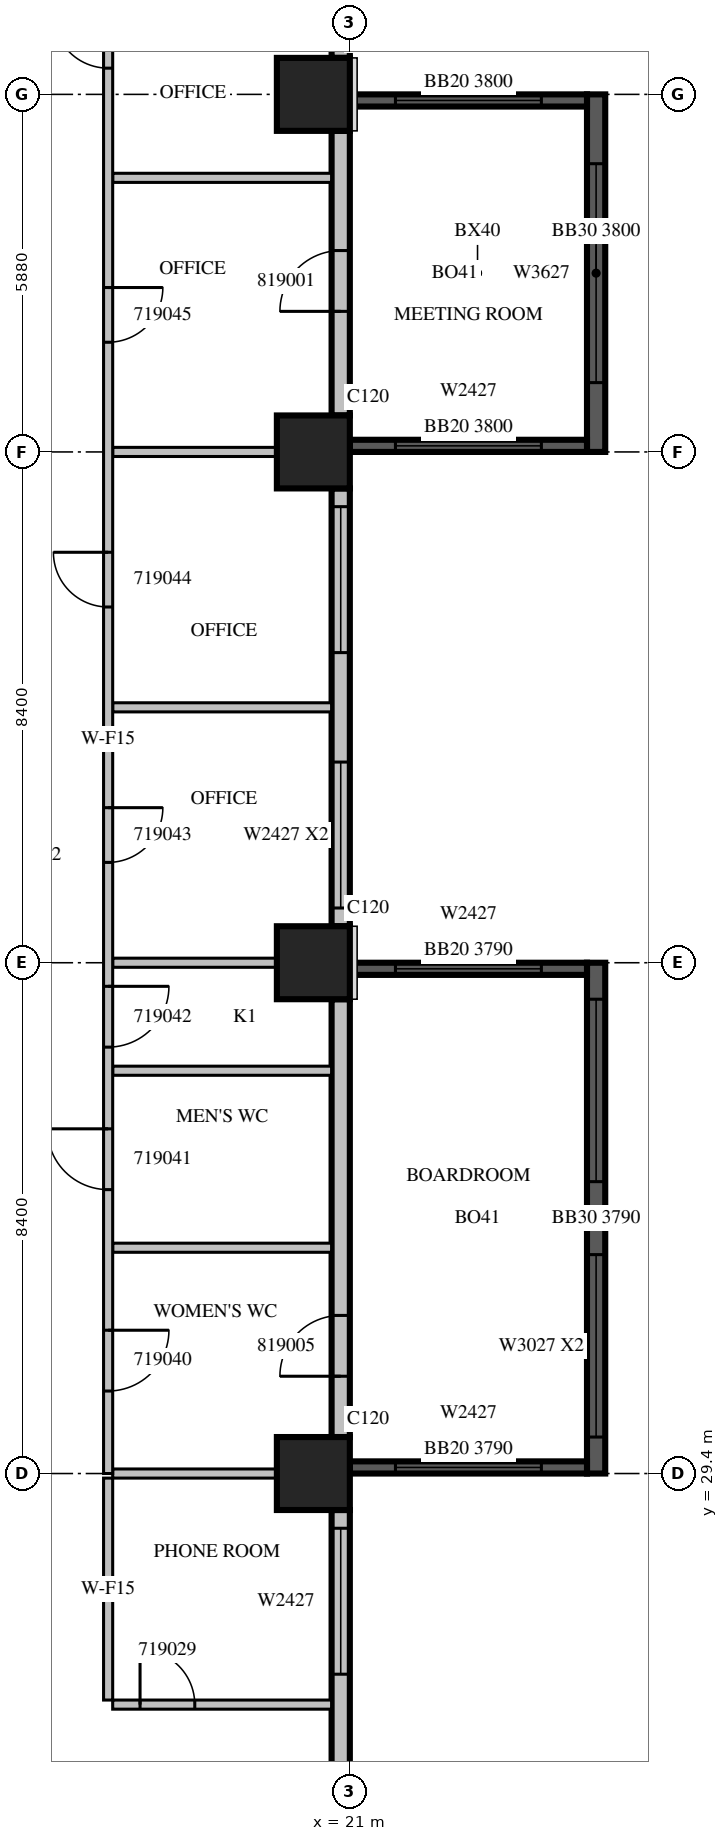
"""IFC4 building model, lengths in metres.
Left out: names, types, materials, properties, quantities, classifications, styles, units other than length and angle.
Written with IfcOpenShell. Run it as: python <this file> out.ifc"""

import sys

from ifc_helpers import new_model, si_unit, direction, frame, frame_2d, origin, origin_2d, place, context, subcontext, project, spatial, rectangle, extrude, source, transform, mapped, element, fill, save


model = new_model("IFC4")
c1 = context("Model", 3, precision=1e-05, world=origin(), true_north=direction((0.0, 1.0)))
c2 = subcontext(c1, "Body", "Model", "MODEL_VIEW")
j1 = project(units=[si_unit("LENGTHUNIT", "METRE"), si_unit("PLANEANGLEUNIT", "RADIAN")], contexts=[c1])
p1 = place(None, origin())
s1 = spatial("IfcSite", under=j1, at=p1, CompositionType="ELEMENT")
p2 = place(p1, origin())
s2 = spatial("IfcBuilding", under=s1, at=p2, CompositionType="ELEMENT")
p3 = place(p2, frame((0.0, 0.0, 90.9)))
s3 = spatial("IfcBuildingStorey", under=s2, at=p3, CompositionType="ELEMENT", Elevation=90.9)
m1 = source(origin(), c2, "Body", "SweptSolid", [
    extrude(rectangle(XDim=1.2, YDim=1.2, at=origin_2d()), origin(), (0.0, 0.0, 1.0), 4.2),
])
for number, where, z_axis, x_axis in (
    (1, (20.4, 29.4, 0.0), (0.0, 0.0, 1.0), (1.0, 0.0, 0.0)),
    (2, (20.4, 37.8, 0.0), (0.0, 0.0, 1.0), (1.0, 0.0, 0.0)),
    (3, (20.4, 46.2, 0.0), (0.0, 0.0, 1.0), (1.0, 0.0, 0.0)),
    (4, (20.4, 52.08, 0.0), (0.0, 0.0, 1.0), (1.0, 0.0, 0.0)),
):
    element("IfcColumn", number, at=place(p3, frame(where, z_axis=z_axis, x_axis=x_axis)), inside=s3, PredefinedType="COLUMN", context=c2, shape_type="MappedRepresentation", body=[
        mapped(m1, transform((0.0, 0.0, 0.0), scale=1.0)),
    ])
m2 = source(origin(), c2, "Body", "SweptSolid", [
    extrude(rectangle(XDim=5.88, YDim=0.3, at=frame_2d((2.94, 0.0))), origin(), (0.0, 0.0, 1.0), 3.8),
])
p4 = place(p3, frame((25.05, 46.2, 0.0), z_axis=(0.0, 0.0, 1.0), x_axis=(0.0, 1.0, 0.0)))
e5 = element("IfcWall", 5, at=p4, inside=s3, PredefinedType="SOLIDWALL", context=c2, shape_type="MappedRepresentation", body=[
    mapped(m2, transform((0.0, 0.0, 0.0), scale=1.0)),
])
m3 = source(origin(), c2, "Body", "SweptSolid", [
    extrude(rectangle(XDim=3.6, YDim=2.7, at=frame_2d((1.8, 1.35))), frame((0.0, 0.16, 0.0), z_axis=(0.0, -1.0, 0.0), x_axis=(1.0, 0.0, 0.0)), (0.0, 0.0, 1.0), 0.32),
])
p5 = place(p4, frame((1.14, 0.0, 0.6)))
e6 = element("IfcOpeningElement", 6, at=p5, cuts=e5, PredefinedType="OPENING", context=c2, shape_type="MappedRepresentation", body=[
    mapped(m3, transform((0.0, 0.0, 0.0), scale=1.0)),
])
m4 = source(origin(), c2, "Body", "SweptSolid", [
    extrude(rectangle(XDim=3.9, YDim=0.2, at=frame_2d((1.95, 0.0))), origin(), (0.0, 0.0, 1.0), 3.8),
])
p6 = place(p3, frame((21.0, 46.3, 0.0), z_axis=(0.0, 0.0, 1.0), x_axis=(1.0, 0.0, 0.0)))
e7 = element("IfcWall", 7, at=p6, inside=s3, PredefinedType="SOLIDWALL", context=c2, shape_type="MappedRepresentation", body=[
    mapped(m4, transform((0.0, 0.0, 0.0), scale=1.0)),
])
m5 = source(origin(), c2, "Body", "SweptSolid", [
    extrude(rectangle(XDim=2.4, YDim=2.7, at=frame_2d((1.2, 1.35))), frame((0.0, 0.11, 0.0), z_axis=(0.0, -1.0, 0.0), x_axis=(1.0, 0.0, 0.0)), (0.0, 0.0, 1.0), 0.22),
])
p7 = place(p6, frame((0.75, 0.0, 0.6)))
e8 = element("IfcOpeningElement", 8, at=p7, cuts=e7, PredefinedType="OPENING", context=c2, shape_type="MappedRepresentation", body=[
    mapped(m5, transform((0.0, 0.0, 0.0), scale=1.0)),
])
p8 = place(p3, frame((21.0, 51.98, 0.0), z_axis=(0.0, 0.0, 1.0), x_axis=(1.0, 0.0, 0.0)))
e9 = element("IfcWall", 9, at=p8, inside=s3, PredefinedType="SOLIDWALL", context=c2, shape_type="MappedRepresentation", body=[
    mapped(m4, transform((0.0, 0.0, 0.0), scale=1.0)),
])
p9 = place(p8, frame((0.75, 0.0, 0.6)))
e10 = element("IfcOpeningElement", 10, at=p9, cuts=e9, PredefinedType="OPENING", context=c2, shape_type="MappedRepresentation", body=[
    mapped(m5, transform((0.0, 0.0, 0.0), scale=1.0)),
])
m6 = source(origin(), c2, "Body", "SweptSolid", [
    extrude(rectangle(XDim=6.6, YDim=0.3, at=frame_2d((3.3, 0.0))), origin(), (0.0, 0.0, 1.0), 3.8),
])
p10 = place(p3, frame((20.85, 22.2, 0.0), z_axis=(0.0, 0.0, 1.0), x_axis=(0.0, 1.0, 0.0)))
e11 = element("IfcWall", 11, at=p10, inside=s3, PredefinedType="STANDARD", context=c2, shape_type="MappedRepresentation", body=[
    mapped(m6, transform((0.0, 0.0, 0.0), scale=1.0)),
])
m7 = source(origin(), c2, "Body", "SweptSolid", [
    extrude(rectangle(XDim=1.2, YDim=2.7, at=frame_2d((0.6, 1.35))), frame((0.0, 0.16, 0.0), z_axis=(0.0, -1.0, 0.0), x_axis=(1.0, 0.0, 0.0)), (0.0, 0.0, 1.0), 0.32),
])
p11 = place(p10, frame((0.3, 0.0, 0.6)))
e12 = element("IfcOpeningElement", 12, at=p11, cuts=e11, PredefinedType="OPENING", context=c2, shape_type="MappedRepresentation", body=[
    mapped(m7, transform((0.0, 0.0, 0.0), scale=1.0)),
])
m8 = source(origin(), c2, "Body", "SweptSolid", [
    extrude(rectangle(XDim=2.4, YDim=2.7, at=frame_2d((1.2, 1.35))), frame((0.0, 0.16, 0.0), z_axis=(0.0, -1.0, 0.0), x_axis=(1.0, 0.0, 0.0)), (0.0, 0.0, 1.0), 0.32),
])
p12 = place(p10, frame((3.9, 0.0, 0.6)))
e13 = element("IfcOpeningElement", 13, at=p12, cuts=e11, PredefinedType="OPENING", context=c2, shape_type="MappedRepresentation", body=[
    mapped(m8, transform((0.0, 0.0, 0.0), scale=1.0)),
])
m9 = source(origin(), c2, "Body", "SweptSolid", [
    extrude(rectangle(XDim=7.2, YDim=0.3, at=frame_2d((3.6, 0.0))), origin(), (0.0, 0.0, 1.0), 3.8),
])
p13 = place(p3, frame((20.85, 30.0, 0.0), z_axis=(0.0, 0.0, 1.0), x_axis=(0.0, 1.0, 0.0)))
e14 = element("IfcWall", 14, at=p13, inside=s3, PredefinedType="STANDARD", context=c2, shape_type="MappedRepresentation", body=[
    mapped(m9, transform((0.0, 0.0, 0.0), scale=1.0)),
])
m10 = source(origin(), c2, "Body", "SweptSolid", [
    extrude(rectangle(XDim=1.0, YDim=2.1, at=frame_2d((0.5, 1.05))), frame((0.0, 0.16, 0.0), z_axis=(0.0, -1.0, 0.0), x_axis=(1.0, 0.0, 0.0)), (0.0, 0.0, 1.0), 0.32),
])
p14 = place(p13, frame((1.0, 0.0, 0.0)))
e15 = element("IfcOpeningElement", 15, at=p14, cuts=e14, PredefinedType="OPENING", context=c2, shape_type="MappedRepresentation", body=[
    mapped(m10, transform((0.0, 0.0, 0.0), scale=1.0)),
])
p15 = place(p3, frame((20.85, 38.4, 0.0), z_axis=(0.0, 0.0, 1.0), x_axis=(0.0, 1.0, 0.0)))
e16 = element("IfcWall", 16, at=p15, inside=s3, PredefinedType="STANDARD", context=c2, shape_type="MappedRepresentation", body=[
    mapped(m9, transform((0.0, 0.0, 0.0), scale=1.0)),
])
p16 = place(p15, frame((0.3, 0.0, 0.6)))
e17 = element("IfcOpeningElement", 17, at=p16, cuts=e16, PredefinedType="OPENING", context=c2, shape_type="MappedRepresentation", body=[
    mapped(m8, transform((0.0, 0.0, 0.0), scale=1.0)),
])
p17 = place(p15, frame((4.5, 0.0, 0.6)))
e18 = element("IfcOpeningElement", 18, at=p17, cuts=e16, PredefinedType="OPENING", context=c2, shape_type="MappedRepresentation", body=[
    mapped(m8, transform((0.0, 0.0, 0.0), scale=1.0)),
])
m11 = source(origin(), c2, "Body", "SweptSolid", [
    extrude(rectangle(XDim=4.68, YDim=0.3, at=frame_2d((2.34, 0.0))), origin(), (0.0, 0.0, 1.0), 3.8),
])
p18 = place(p3, frame((20.85, 46.8, 0.0), z_axis=(0.0, 0.0, 1.0), x_axis=(0.0, 1.0, 0.0)))
e19 = element("IfcWall", 19, at=p18, inside=s3, PredefinedType="STANDARD", context=c2, shape_type="MappedRepresentation", body=[
    mapped(m11, transform((0.0, 0.0, 0.0), scale=1.0)),
])
p19 = place(p18, frame((1.712, 0.0, 0.0)))
e20 = element("IfcOpeningElement", 20, at=p19, cuts=e19, PredefinedType="OPENING", context=c2, shape_type="MappedRepresentation", body=[
    mapped(m10, transform((0.0, 0.0, 0.0), scale=1.0)),
])
m12 = source(origin(), c2, "Body", "SweptSolid", [
    extrude(rectangle(XDim=1.08, YDim=0.3, at=frame_2d((0.54, 0.0))), origin(), (0.0, 0.0, 1.0), 3.8),
])
p20 = place(p3, frame((20.85, 52.68, 0.0), z_axis=(0.0, 0.0, 1.0), x_axis=(0.0, 1.0, 0.0)))
e21 = element("IfcWall", 21, at=p20, inside=s3, PredefinedType="STANDARD", context=c2, shape_type="MappedRepresentation", body=[
    mapped(m12, transform((0.0, 0.0, 0.0), scale=1.0)),
])
m13 = source(origin(), c2, "Body", "SweptSolid", [
    extrude(rectangle(XDim=8.4, YDim=0.3, at=frame_2d((4.2, 0.0))), origin(), (0.0, 0.0, 1.0), 3.79),
])
p21 = place(p3, frame((25.05, 29.4, 0.0), z_axis=(0.0, 0.0, 1.0), x_axis=(0.0, 1.0, 0.0)))
e22 = element("IfcWall", 22, at=p21, inside=s3, PredefinedType="SOLIDWALL", context=c2, shape_type="MappedRepresentation", body=[
    mapped(m13, transform((0.0, 0.0, 0.0), scale=1.0)),
])
m14 = source(origin(), c2, "Body", "SweptSolid", [
    extrude(rectangle(XDim=3.0, YDim=2.7, at=frame_2d((1.5, 1.35))), frame((0.0, 0.16, 0.0), z_axis=(0.0, -1.0, 0.0), x_axis=(1.0, 0.0, 0.0)), (0.0, 0.0, 1.0), 0.32),
])
p22 = place(p21, frame((0.6, 0.0, 0.6)))
e23 = element("IfcOpeningElement", 23, at=p22, cuts=e22, PredefinedType="OPENING", context=c2, shape_type="MappedRepresentation", body=[
    mapped(m14, transform((0.0, 0.0, 0.0), scale=1.0)),
])
p23 = place(p21, frame((4.8, 0.0, 0.6)))
e24 = element("IfcOpeningElement", 24, at=p23, cuts=e22, PredefinedType="OPENING", context=c2, shape_type="MappedRepresentation", body=[
    mapped(m14, transform((0.0, 0.0, 0.0), scale=1.0)),
])
m15 = source(origin(), c2, "Body", "SweptSolid", [
    extrude(rectangle(XDim=3.9, YDim=0.2, at=frame_2d((1.95, 0.0))), origin(), (0.0, 0.0, 1.0), 3.79),
])
p24 = place(p3, frame((21.0, 29.5, 0.0), z_axis=(0.0, 0.0, 1.0), x_axis=(1.0, 0.0, 0.0)))
e25 = element("IfcWall", 25, at=p24, inside=s3, PredefinedType="SOLIDWALL", context=c2, shape_type="MappedRepresentation", body=[
    mapped(m15, transform((0.0, 0.0, 0.0), scale=1.0)),
])
p25 = place(p24, frame((0.75, 0.0, 0.6)))
e26 = element("IfcOpeningElement", 26, at=p25, cuts=e25, PredefinedType="OPENING", context=c2, shape_type="MappedRepresentation", body=[
    mapped(m5, transform((0.0, 0.0, 0.0), scale=1.0)),
])
p26 = place(p3, frame((21.0, 37.7, 0.0), z_axis=(0.0, 0.0, 1.0), x_axis=(1.0, 0.0, 0.0)))
e27 = element("IfcWall", 27, at=p26, inside=s3, PredefinedType="SOLIDWALL", context=c2, shape_type="MappedRepresentation", body=[
    mapped(m15, transform((0.0, 0.0, 0.0), scale=1.0)),
])
p27 = place(p26, frame((0.75, 0.0, 0.6)))
e28 = element("IfcOpeningElement", 28, at=p27, cuts=e27, PredefinedType="OPENING", context=c2, shape_type="MappedRepresentation", body=[
    mapped(m5, transform((0.0, 0.0, 0.0), scale=1.0)),
])
m16 = source(origin(), c2, "Body", "SweptSolid", [
    extrude(rectangle(XDim=3.6, YDim=0.15, at=frame_2d((1.8, 0.0))), origin(), (0.0, 0.0, 1.0), 3.8),
])
p28 = place(p3, frame((17.1, 25.6, 0.0), z_axis=(0.0, 0.0, 1.0), x_axis=(1.0, 0.0, 0.0)))
e29 = element("IfcWall", 29, at=p28, inside=s3, PredefinedType="PARTITIONING", context=c2, shape_type="MappedRepresentation", body=[
    mapped(m16, transform((0.0, 0.0, 0.0), scale=1.0)),
])
m17 = source(origin(), c2, "Body", "SweptSolid", [
    extrude(rectangle(XDim=0.9, YDim=2.1, at=frame_2d((0.45, 1.05))), frame((0.0, 0.085, 0.0), z_axis=(0.0, -1.0, 0.0), x_axis=(1.0, 0.0, 0.0)), (0.0, 0.0, 1.0), 0.17),
])
p29 = place(p28, frame((0.45, 0.0, 0.0)))
e30 = element("IfcOpeningElement", 30, at=p29, cuts=e29, PredefinedType="OPENING", context=c2, shape_type="MappedRepresentation", body=[
    mapped(m17, transform((0.0, 0.0, 0.0), scale=1.0)),
])
m18 = source(origin(), c2, "Body", "SweptSolid", [
    extrude(rectangle(XDim=3.65, YDim=0.15, at=frame_2d((1.825, 0.0))), origin(), (0.0, 0.0, 1.0), 3.8),
])
p30 = place(p3, frame((17.025, 29.325, 0.0), z_axis=(0.0, 0.0, 1.0), x_axis=(0.0, -1.0, 0.0)))
e31 = element("IfcWall", 31, at=p30, inside=s3, PredefinedType="PARTITIONING", context=c2, shape_type="MappedRepresentation", body=[
    mapped(m18, transform((0.0, 0.0, 0.0), scale=1.0)),
])
m19 = source(origin(), c2, "Body", "SweptSolid", [
    extrude(rectangle(XDim=2.701, YDim=0.15, at=frame_2d((1.351, 0.0))), origin(), (0.0, 0.0, 1.0), 3.8),
])
p31 = place(p3, frame((19.801, 29.4, 0.0), z_axis=(0.0, 0.0, 1.0), x_axis=(-1.0, 0.0, 0.0)))
e32 = element("IfcWall", 32, at=p31, inside=s3, PredefinedType="PARTITIONING", context=c2, shape_type="MappedRepresentation", body=[
    mapped(m19, transform((0.0, 0.0, 0.0), scale=1.0)),
])
for number, where, z_axis, x_axis in (
    (33, (17.1, 33.113, 0.0), (0.0, 0.0, 1.0), (1.0, 0.0, 0.0)),
    (34, (17.1, 36.024, 0.0), (0.0, 0.0, 1.0), (1.0, 0.0, 0.0)),
    (35, (17.1, 42.0, 0.0), (0.0, 0.0, 1.0), (1.0, 0.0, 0.0)),
    (36, (17.1, 50.708, 0.0), (0.0, 0.0, 1.0), (1.0, 0.0, 0.0)),
):
    element("IfcWall", number, at=place(p3, frame(where, z_axis=z_axis, x_axis=x_axis)), inside=s3, PredefinedType="PARTITIONING", context=c2, shape_type="MappedRepresentation", body=[
        mapped(m16, transform((0.0, 0.0, 0.0), scale=1.0)),
    ])
for number, where, z_axis, x_axis in (
    (37, (19.801, 37.8, 0.0), (0.0, 0.0, 1.0), (-1.0, 0.0, 0.0)),
    (38, (19.801, 46.2, 0.0), (0.0, 0.0, 1.0), (-1.0, 0.0, 0.0)),
):
    element("IfcWall", number, at=place(p3, frame(where, z_axis=z_axis, x_axis=x_axis)), inside=s3, PredefinedType="PARTITIONING", context=c2, shape_type="MappedRepresentation", body=[
        mapped(m19, transform((0.0, 0.0, 0.0), scale=1.0)),
    ])
p32 = place(p3, frame((17.025, 53.555, 0.0), z_axis=(0.0, 0.0, 1.0), x_axis=(0.0, -1.0, 0.0)))
e39 = element("IfcWall", 39, at=p32, inside=s3, PredefinedType="PARTITIONING", context=c2, shape_type="SweptSolid", body=[
    extrude(rectangle(XDim=24.155, YDim=0.15, at=frame_2d((12.078, 0.0))), origin(), (0.0, 0.0, 1.0), 3.8),
])
m20 = source(origin(), c2, "Body", "SweptSolid", [
    extrude(rectangle(XDim=1.0, YDim=2.1, at=frame_2d((0.5, 1.05))), frame((0.0, 0.085, 0.0), z_axis=(0.0, -1.0, 0.0), x_axis=(1.0, 0.0, 0.0)), (0.0, 0.0, 1.0), 0.17),
])
p33 = place(p32, frame((21.798, 0.0, 0.0)))
e40 = element("IfcOpeningElement", 40, at=p33, cuts=e39, PredefinedType="OPENING", context=c2, shape_type="MappedRepresentation", body=[
    mapped(m20, transform((0.0, 0.0, 0.0), scale=1.0)),
])
p34 = place(p32, frame((18.486, 0.0, 0.0)))
e41 = element("IfcOpeningElement", 41, at=p34, cuts=e39, PredefinedType="OPENING", context=c2, shape_type="MappedRepresentation", body=[
    mapped(m20, transform((0.0, 0.0, 0.0), scale=1.0)),
])
p35 = place(p32, frame((16.143, 0.0, 0.0)))
e42 = element("IfcOpeningElement", 42, at=p35, cuts=e39, PredefinedType="OPENING", context=c2, shape_type="MappedRepresentation", body=[
    mapped(m20, transform((0.0, 0.0, 0.0), scale=1.0)),
])
p36 = place(p32, frame((13.205, 0.0, 0.0)))
e43 = element("IfcOpeningElement", 43, at=p36, cuts=e39, PredefinedType="OPENING", context=c2, shape_type="MappedRepresentation", body=[
    mapped(m17, transform((0.0, 0.0, 0.0), scale=1.0)),
])
p37 = place(p32, frame((9.005, 0.0, 0.0)))
e44 = element("IfcOpeningElement", 44, at=p37, cuts=e39, PredefinedType="OPENING", context=c2, shape_type="MappedRepresentation", body=[
    mapped(m17, transform((0.0, 0.0, 0.0), scale=1.0)),
])
p38 = place(p32, frame((4.651, 0.0, 0.0)))
e45 = element("IfcOpeningElement", 45, at=p38, cuts=e39, PredefinedType="OPENING", context=c2, shape_type="MappedRepresentation", body=[
    mapped(m17, transform((0.0, 0.0, 0.0), scale=1.0)),
])
p39 = place(p32, frame((0.144, 0.0, 0.0)))
e46 = element("IfcOpeningElement", 46, at=p39, cuts=e39, PredefinedType="OPENING", context=c2, shape_type="MappedRepresentation", body=[
    mapped(m17, transform((0.0, 0.0, 0.0), scale=1.0)),
])
m21 = source(origin(), c2, "Body", "SweptSolid", [
    extrude(rectangle(XDim=3.6, YDim=2.7, at=frame_2d((1.8, 1.35))), frame((0.0, 0.03, 0.0), z_axis=(0.0, -1.0, 0.0), x_axis=(1.0, 0.0, 0.0)), (0.0, 0.0, 1.0), 0.06),
])
p40 = place(p5, origin())
e47 = element("IfcWindow", 47, at=p40, inside=s3, PartitioningType="SINGLE_PANEL", PredefinedType="WINDOW", context=c2, shape_type="MappedRepresentation", body=[
    mapped(m21, transform((0.0, 0.0, 0.0), scale=1.0)),
])
fill(e6, e47)
m22 = source(origin(), c2, "Body", "SweptSolid", [
    extrude(rectangle(XDim=2.4, YDim=2.7, at=frame_2d((1.2, 1.35))), frame((0.0, 0.03, 0.0), z_axis=(0.0, -1.0, 0.0), x_axis=(1.0, 0.0, 0.0)), (0.0, 0.0, 1.0), 0.06),
])
p41 = place(p7, origin())
e48 = element("IfcWindow", 48, at=p41, inside=s3, PartitioningType="SINGLE_PANEL", PredefinedType="WINDOW", context=c2, shape_type="MappedRepresentation", body=[
    mapped(m22, transform((0.0, 0.0, 0.0), scale=1.0)),
])
fill(e8, e48)
p42 = place(p9, origin())
e49 = element("IfcWindow", 49, at=p42, inside=s3, PartitioningType="SINGLE_PANEL", PredefinedType="WINDOW", context=c2, shape_type="MappedRepresentation", body=[
    mapped(m22, transform((0.0, 0.0, 0.0), scale=1.0)),
])
fill(e10, e49)
p43 = place(p12, origin())
e50 = element("IfcWindow", 50, at=p43, inside=s3, PartitioningType="SINGLE_PANEL", PredefinedType="WINDOW", context=c2, shape_type="MappedRepresentation", body=[
    mapped(m22, transform((0.0, 0.0, 0.0), scale=1.0)),
])
fill(e13, e50)
p44 = place(p16, origin())
e51 = element("IfcWindow", 51, at=p44, inside=s3, PartitioningType="SINGLE_PANEL", PredefinedType="WINDOW", context=c2, shape_type="MappedRepresentation", body=[
    mapped(m22, transform((0.0, 0.0, 0.0), scale=1.0)),
])
fill(e17, e51)
p45 = place(p17, origin())
e52 = element("IfcWindow", 52, at=p45, inside=s3, PartitioningType="SINGLE_PANEL", PredefinedType="WINDOW", context=c2, shape_type="MappedRepresentation", body=[
    mapped(m22, transform((0.0, 0.0, 0.0), scale=1.0)),
])
fill(e18, e52)
m23 = source(origin(), c2, "Body", "SweptSolid", [
    extrude(rectangle(XDim=3.0, YDim=2.7, at=frame_2d((1.5, 1.35))), frame((0.0, 0.03, 0.0), z_axis=(0.0, -1.0, 0.0), x_axis=(1.0, 0.0, 0.0)), (0.0, 0.0, 1.0), 0.06),
])
p46 = place(p22, origin())
e53 = element("IfcWindow", 53, at=p46, inside=s3, PartitioningType="SINGLE_PANEL", PredefinedType="WINDOW", context=c2, shape_type="MappedRepresentation", body=[
    mapped(m23, transform((0.0, 0.0, 0.0), scale=1.0)),
])
fill(e23, e53)
p47 = place(p23, origin())
e54 = element("IfcWindow", 54, at=p47, inside=s3, PartitioningType="SINGLE_PANEL", PredefinedType="WINDOW", context=c2, shape_type="MappedRepresentation", body=[
    mapped(m23, transform((0.0, 0.0, 0.0), scale=1.0)),
])
fill(e24, e54)
p48 = place(p25, origin())
e55 = element("IfcWindow", 55, at=p48, inside=s3, PartitioningType="SINGLE_PANEL", PredefinedType="WINDOW", context=c2, shape_type="MappedRepresentation", body=[
    mapped(m22, transform((0.0, 0.0, 0.0), scale=1.0)),
])
fill(e26, e55)
p49 = place(p27, origin())
e56 = element("IfcWindow", 56, at=p49, inside=s3, PartitioningType="SINGLE_PANEL", PredefinedType="WINDOW", context=c2, shape_type="MappedRepresentation", body=[
    mapped(m22, transform((0.0, 0.0, 0.0), scale=1.0)),
])
fill(e28, e56)
m24 = source(origin(), c2, "Body", "SweptSolid", [
    extrude(rectangle(XDim=0.9, YDim=2.1, at=frame_2d((0.45, 1.05))), frame((0.0, 0.025, 0.0), z_axis=(0.0, -1.0, 0.0), x_axis=(1.0, 0.0, 0.0)), (0.0, 0.0, 1.0), 0.05),
])
p50 = place(p29, origin())
e57 = element("IfcDoor", 57, at=p50, inside=s3, OperationType="SINGLE_SWING_LEFT", PredefinedType="DOOR", context=c2, shape_type="MappedRepresentation", body=[
    mapped(m24, transform((0.0, 0.0, 0.0), scale=1.0)),
])
fill(e30, e57)
m25 = source(origin(), c2, "Body", "SweptSolid", [
    extrude(rectangle(XDim=1.0, YDim=2.1, at=frame_2d((0.5, 1.05))), frame((0.0, 0.025, 0.0), z_axis=(0.0, -1.0, 0.0), x_axis=(1.0, 0.0, 0.0)), (0.0, 0.0, 1.0), 0.05),
])
p51 = place(p33, origin())
e58 = element("IfcDoor", 58, at=p51, inside=s3, OperationType="SINGLE_SWING_LEFT", PredefinedType="DOOR", context=c2, shape_type="MappedRepresentation", body=[
    mapped(m25, transform((0.0, 0.0, 0.0), scale=1.0)),
])
fill(e40, e58)
p52 = place(p34, origin())
e59 = element("IfcDoor", 59, at=p52, inside=s3, OperationType="SINGLE_SWING_RIGHT", PredefinedType="DOOR", context=c2, shape_type="MappedRepresentation", body=[
    mapped(m25, transform((0.0, 0.0, 0.0), scale=1.0)),
])
fill(e41, e59)
p53 = place(p35, origin())
e60 = element("IfcDoor", 60, at=p53, inside=s3, OperationType="SINGLE_SWING_LEFT", PredefinedType="DOOR", context=c2, shape_type="MappedRepresentation", body=[
    mapped(m25, transform((0.0, 0.0, 0.0), scale=1.0)),
])
fill(e42, e60)
p54 = place(p36, origin())
e61 = element("IfcDoor", 61, at=p54, inside=s3, OperationType="SINGLE_SWING_LEFT", PredefinedType="DOOR", context=c2, shape_type="MappedRepresentation", body=[
    mapped(m24, transform((0.0, 0.0, 0.0), scale=1.0)),
])
fill(e43, e61)
p55 = place(p37, origin())
e62 = element("IfcDoor", 62, at=p55, inside=s3, OperationType="SINGLE_SWING_RIGHT", PredefinedType="DOOR", context=c2, shape_type="MappedRepresentation", body=[
    mapped(m24, transform((0.0, 0.0, 0.0), scale=1.0)),
])
fill(e44, e62)
p56 = place(p38, origin())
e63 = element("IfcDoor", 63, at=p56, inside=s3, OperationType="SINGLE_SWING_LEFT", PredefinedType="DOOR", context=c2, shape_type="MappedRepresentation", body=[
    mapped(m24, transform((0.0, 0.0, 0.0), scale=1.0)),
])
fill(e45, e63)
p57 = place(p39, origin())
e64 = element("IfcDoor", 64, at=p57, inside=s3, OperationType="SINGLE_SWING_RIGHT", PredefinedType="DOOR", context=c2, shape_type="MappedRepresentation", body=[
    mapped(m24, transform((0.0, 0.0, 0.0), scale=1.0)),
])
fill(e46, e64)
p58 = place(p19, origin())
e65 = element("IfcDoor", 65, at=p58, inside=s3, OperationType="SINGLE_SWING_LEFT", PredefinedType="DOOR", context=c2, shape_type="MappedRepresentation", body=[
    mapped(m25, transform((0.0, 0.0, 0.0), scale=1.0)),
])
fill(e20, e65)
p59 = place(p14, origin())
e66 = element("IfcDoor", 66, at=p59, inside=s3, OperationType="SINGLE_SWING_LEFT", PredefinedType="DOOR", context=c2, shape_type="MappedRepresentation", body=[
    mapped(m25, transform((0.0, 0.0, 0.0), scale=1.0)),
])
fill(e15, e66)
save(model, sys.argv[1])
